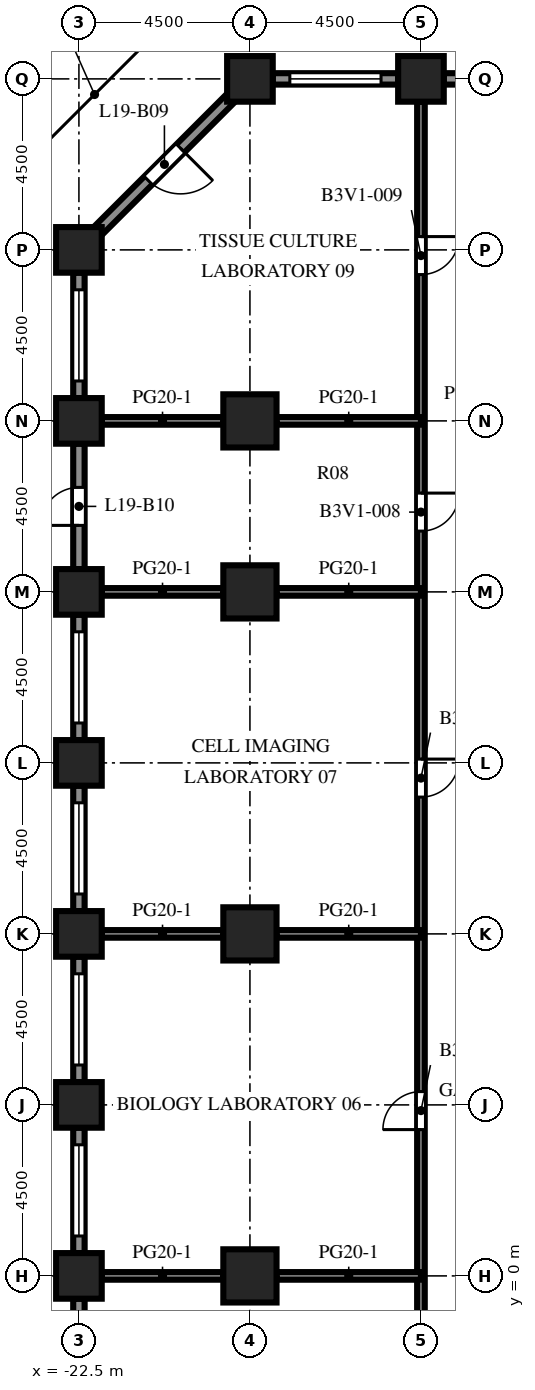
"""IFC4 building model, lengths in metres.
Left out: names, types, materials, properties, quantities, classifications, styles, units other than length and angle.
Written with IfcOpenShell. Run it as: python <this file> out.ifc"""

import sys

from ifc_helpers import new_model, si_unit, direction, frame, frame_2d, origin, origin_2d, place, context, subcontext, project, spatial, rectangle, extrude, element, fill, save


model = new_model("IFC4")
c1 = context("Model", 3, precision=1e-05, world=origin(), true_north=direction((0.0, 1.0)))
c2 = subcontext(c1, "Body", "Model", "MODEL_VIEW")
j1 = project(units=[si_unit("LENGTHUNIT", "METRE"), si_unit("PLANEANGLEUNIT", "RADIAN")], contexts=[c1])
p1 = place(None, origin())
s1 = spatial("IfcSite", under=j1, at=p1, CompositionType="ELEMENT")
p2 = place(p1, origin())
s2 = spatial("IfcBuilding", under=s1, at=p2, CompositionType="ELEMENT")
p3 = place(p2, frame((0.0, 0.0, 86.1)))
s3 = spatial("IfcBuildingStorey", under=s2, at=p3, CompositionType="ELEMENT", Elevation=86.1)
for number, where, z_axis, x_axis in (
    (1, (-22.5, 0.0, 0.0), (0.0, 0.0, 1.0), (1.0, 0.0, 0.0)),
    (2, (-22.5, 4.5, 0.0), (0.0, 0.0, 1.0), (1.0, 0.0, 0.0)),
    (3, (-22.5, 9.0, 0.0), (0.0, 0.0, 1.0), (1.0, 0.0, 0.0)),
    (4, (-22.5, 13.5, 0.0), (0.0, 0.0, 1.0), (1.0, 0.0, 0.0)),
    (5, (-22.5, 18.0, 0.0), (0.0, 0.0, 1.0), (1.0, 0.0, 0.0)),
    (6, (-22.5, 22.5, 0.0), (0.0, 0.0, 1.0), (1.0, 0.0, 0.0)),
    (7, (-22.5, 27.0, 0.0), (0.0, 0.0, 1.0), (1.0, 0.0, 0.0)),
    (8, (-18.0, 31.5, 0.0), (0.0, 0.0, 1.0), (1.0, 0.0, 0.0)),
    (9, (-13.5, 31.5, 0.0), (0.0, 0.0, 1.0), (1.0, 0.0, 0.0)),
):
    element("IfcColumn", number, at=place(p3, frame(where, z_axis=z_axis, x_axis=x_axis)), inside=s3, PredefinedType="COLUMN", context=c2, shape_type="SweptSolid", body=[
        extrude(rectangle(XDim=1.2, YDim=1.2, at=origin_2d()), origin(), (0.0, 0.0, 1.0), 4.1),
    ])
for number, where, z_axis, x_axis in (
    (10, (-18.0, 0.0, 0.0), (0.0, 0.0, 1.0), (1.0, 0.0, 0.0)),
    (11, (-18.0, 9.0, 0.0), (0.0, 0.0, 1.0), (1.0, 0.0, 0.0)),
    (12, (-18.0, 18.0, 0.0), (0.0, 0.0, 1.0), (1.0, 0.0, 0.0)),
    (13, (-18.0, 22.5, 0.0), (0.0, 0.0, 1.0), (1.0, 0.0, 0.0)),
):
    element("IfcColumn", number, at=place(p3, frame(where, z_axis=z_axis, x_axis=x_axis)), inside=s3, PredefinedType="COLUMN", context=c2, shape_type="SweptSolid", body=[
        extrude(rectangle(XDim=1.4, YDim=1.4, at=origin_2d()), origin(), (0.0, 0.0, 1.0), 4.1),
    ])
p4 = place(p3, frame((-12.9, 31.5, 0.0), z_axis=(0.0, 0.0, 1.0), x_axis=(1.0, 0.0, 0.0)))
e14 = element("IfcWall", 14, at=p4, inside=s3, PredefinedType="SOLIDWALL", context=c2, shape_type="SweptSolid", body=[
    extrude(rectangle(XDim=3.3, YDim=0.3, at=frame_2d((1.65, 0.0))), origin(), (0.0, 0.0, 1.0), 2.75),
])
p5 = place(p4, frame((1.15, 0.0, 0.0)))
e15 = element("IfcOpeningElement", 15, at=p5, cuts=e14, PredefinedType="OPENING", context=c2, shape_type="SweptSolid", body=[
    extrude(rectangle(XDim=1.0, YDim=2.2, at=frame_2d((0.5, 1.1))), frame((0.0, 0.16, 0.0), z_axis=(0.0, -1.0, 0.0), x_axis=(1.0, 0.0, 0.0)), (0.0, 0.0, 1.0), 0.32),
])
p6 = place(p3, frame((-17.4, 31.5, 0.0), z_axis=(0.0, 0.0, 1.0), x_axis=(1.0, 0.0, 0.0)))
e16 = element("IfcWall", 16, at=p6, inside=s3, PredefinedType="SOLIDWALL", context=c2, shape_type="SweptSolid", body=[
    extrude(rectangle(XDim=3.3, YDim=0.3, at=frame_2d((1.65, 0.0))), origin(), (0.0, 0.0, 1.0), 2.75),
])
p7 = place(p6, frame((0.45, 0.0, 0.8)))
e17 = element("IfcOpeningElement", 17, at=p7, cuts=e16, PredefinedType="OPENING", context=c2, shape_type="SweptSolid", body=[
    extrude(rectangle(XDim=2.4, YDim=1.7, at=frame_2d((1.2, 0.85))), frame((0.0, 0.16, 0.0), z_axis=(0.0, -1.0, 0.0), x_axis=(1.0, 0.0, 0.0)), (0.0, 0.0, 1.0), 0.32),
])
p8 = place(p3, frame((-22.006, 27.494, 0.0), z_axis=(0.0, 0.0, 1.0), x_axis=(0.707106781187, 0.707106781187, 0.0)))
e18 = element("IfcWall", 18, at=p8, inside=s3, PredefinedType="SOLIDWALL", context=c2, shape_type="SweptSolid", body=[
    extrude(rectangle(XDim=4.967, YDim=0.3, at=frame_2d((2.483, 0.0))), origin(), (0.0, 0.0, 1.0), 2.75),
])
p9 = place(p8, frame((1.884, 0.0, 0.0)))
e19 = element("IfcOpeningElement", 19, at=p9, cuts=e18, PredefinedType="OPENING", context=c2, shape_type="SweptSolid", body=[
    extrude(rectangle(XDim=1.2, YDim=2.2, at=frame_2d((0.6, 1.1))), frame((0.0, 0.16, 0.0), z_axis=(0.0, -1.0, 0.0), x_axis=(1.0, 0.0, 0.0)), (0.0, 0.0, 1.0), 0.32),
])
p10 = place(p3, frame((-22.5, 23.1, 0.0), z_axis=(0.0, 0.0, 1.0), x_axis=(0.0, 1.0, 0.0)))
e20 = element("IfcWall", 20, at=p10, inside=s3, PredefinedType="SOLIDWALL", context=c2, shape_type="SweptSolid", body=[
    extrude(rectangle(XDim=3.3, YDim=0.3, at=frame_2d((1.65, 0.0))), origin(), (0.0, 0.0, 1.0), 2.75),
])
p11 = place(p10, frame((0.45, 0.0, 0.8)))
e21 = element("IfcOpeningElement", 21, at=p11, cuts=e20, PredefinedType="OPENING", context=c2, shape_type="SweptSolid", body=[
    extrude(rectangle(XDim=2.4, YDim=1.7, at=frame_2d((1.2, 0.85))), frame((0.0, 0.16, 0.0), z_axis=(0.0, -1.0, 0.0), x_axis=(1.0, 0.0, 0.0)), (0.0, 0.0, 1.0), 0.32),
])
p12 = place(p3, frame((-22.5, 18.6, 0.0), z_axis=(0.0, 0.0, 1.0), x_axis=(0.0, 1.0, 0.0)))
e22 = element("IfcWall", 22, at=p12, inside=s3, PredefinedType="SOLIDWALL", context=c2, shape_type="SweptSolid", body=[
    extrude(rectangle(XDim=3.3, YDim=0.3, at=frame_2d((1.65, 0.0))), origin(), (0.0, 0.0, 1.0), 2.75),
])
p13 = place(p12, frame((1.15, 0.0, 0.0)))
e23 = element("IfcOpeningElement", 23, at=p13, cuts=e22, PredefinedType="OPENING", context=c2, shape_type="SweptSolid", body=[
    extrude(rectangle(XDim=1.0, YDim=2.2, at=frame_2d((0.5, 1.1))), frame((0.0, 0.16, 0.0), z_axis=(0.0, -1.0, 0.0), x_axis=(1.0, 0.0, 0.0)), (0.0, 0.0, 1.0), 0.32),
])
p14 = place(p3, frame((-22.5, 14.1, 0.0), z_axis=(0.0, 0.0, 1.0), x_axis=(0.0, 1.0, 0.0)))
e24 = element("IfcWall", 24, at=p14, inside=s3, PredefinedType="SOLIDWALL", context=c2, shape_type="SweptSolid", body=[
    extrude(rectangle(XDim=3.3, YDim=0.3, at=frame_2d((1.65, 0.0))), origin(), (0.0, 0.0, 1.0), 2.75),
])
p15 = place(p14, frame((0.45, 0.0, 0.8)))
e25 = element("IfcOpeningElement", 25, at=p15, cuts=e24, PredefinedType="OPENING", context=c2, shape_type="SweptSolid", body=[
    extrude(rectangle(XDim=2.4, YDim=1.7, at=frame_2d((1.2, 0.85))), frame((0.0, 0.16, 0.0), z_axis=(0.0, -1.0, 0.0), x_axis=(1.0, 0.0, 0.0)), (0.0, 0.0, 1.0), 0.32),
])
p16 = place(p3, frame((-22.5, 9.6, 0.0), z_axis=(0.0, 0.0, 1.0), x_axis=(0.0, 1.0, 0.0)))
e26 = element("IfcWall", 26, at=p16, inside=s3, PredefinedType="SOLIDWALL", context=c2, shape_type="SweptSolid", body=[
    extrude(rectangle(XDim=3.3, YDim=0.3, at=frame_2d((1.65, 0.0))), origin(), (0.0, 0.0, 1.0), 2.75),
])
p17 = place(p16, frame((0.45, 0.0, 0.8)))
e27 = element("IfcOpeningElement", 27, at=p17, cuts=e26, PredefinedType="OPENING", context=c2, shape_type="SweptSolid", body=[
    extrude(rectangle(XDim=2.4, YDim=1.7, at=frame_2d((1.2, 0.85))), frame((0.0, 0.16, 0.0), z_axis=(0.0, -1.0, 0.0), x_axis=(1.0, 0.0, 0.0)), (0.0, 0.0, 1.0), 0.32),
])
p18 = place(p3, frame((-22.5, 5.1, 0.0), z_axis=(0.0, 0.0, 1.0), x_axis=(0.0, 1.0, 0.0)))
e28 = element("IfcWall", 28, at=p18, inside=s3, PredefinedType="SOLIDWALL", context=c2, shape_type="SweptSolid", body=[
    extrude(rectangle(XDim=3.3, YDim=0.3, at=frame_2d((1.65, 0.0))), origin(), (0.0, 0.0, 1.0), 2.75),
])
p19 = place(p18, frame((0.45, 0.0, 0.8)))
e29 = element("IfcOpeningElement", 29, at=p19, cuts=e28, PredefinedType="OPENING", context=c2, shape_type="SweptSolid", body=[
    extrude(rectangle(XDim=2.4, YDim=1.7, at=frame_2d((1.2, 0.85))), frame((0.0, 0.16, 0.0), z_axis=(0.0, -1.0, 0.0), x_axis=(1.0, 0.0, 0.0)), (0.0, 0.0, 1.0), 0.32),
])
p20 = place(p3, frame((-22.5, 0.6, 0.0), z_axis=(0.0, 0.0, 1.0), x_axis=(0.0, 1.0, 0.0)))
e30 = element("IfcWall", 30, at=p20, inside=s3, PredefinedType="SOLIDWALL", context=c2, shape_type="SweptSolid", body=[
    extrude(rectangle(XDim=3.3, YDim=0.3, at=frame_2d((1.65, 0.0))), origin(), (0.0, 0.0, 1.0), 2.75),
])
p21 = place(p20, frame((0.45, 0.0, 0.8)))
e31 = element("IfcOpeningElement", 31, at=p21, cuts=e30, PredefinedType="OPENING", context=c2, shape_type="SweptSolid", body=[
    extrude(rectangle(XDim=2.4, YDim=1.7, at=frame_2d((1.2, 0.85))), frame((0.0, 0.16, 0.0), z_axis=(0.0, -1.0, 0.0), x_axis=(1.0, 0.0, 0.0)), (0.0, 0.0, 1.0), 0.32),
])
p22 = place(p3, frame((-22.5, -3.9, 0.0), z_axis=(0.0, 0.0, 1.0), x_axis=(0.0, 1.0, 0.0)))
e32 = element("IfcWall", 32, at=p22, inside=s3, PredefinedType="SOLIDWALL", context=c2, shape_type="SweptSolid", body=[
    extrude(rectangle(XDim=3.3, YDim=0.3, at=frame_2d((1.65, 0.0))), origin(), (0.0, 0.0, 1.0), 2.75),
])
p23 = place(p22, frame((0.45, 0.0, 0.8)))
e33 = element("IfcOpeningElement", 33, at=p23, cuts=e32, PredefinedType="OPENING", context=c2, shape_type="SweptSolid", body=[
    extrude(rectangle(XDim=2.4, YDim=1.7, at=frame_2d((1.2, 0.85))), frame((0.0, 0.16, 0.0), z_axis=(0.0, -1.0, 0.0), x_axis=(1.0, 0.0, 0.0)), (0.0, 0.0, 1.0), 0.32),
])
p24 = place(p3, frame((-13.5, -21.9, 0.0), z_axis=(0.0, 0.0, 1.0), x_axis=(0.0, 1.0, 0.0)))
e34 = element("IfcWall", 34, at=p24, inside=s3, PredefinedType="PARTITIONING", context=c2, shape_type="SweptSolid", body=[
    extrude(rectangle(XDim=52.8, YDim=0.2, at=frame_2d((26.4, 0.0))), origin(), (0.0, 0.0, 1.0), 3.65),
])
p25 = place(p24, frame((3.0, 0.0, 0.0)))
e35 = element("IfcOpeningElement", 35, at=p25, cuts=e34, PredefinedType="OPENING", context=c2, shape_type="SweptSolid", body=[
    extrude(rectangle(XDim=1.0, YDim=2.1, at=frame_2d((0.5, 1.05))), frame((0.0, 0.11, 0.0), z_axis=(0.0, -1.0, 0.0), x_axis=(1.0, 0.0, 0.0)), (0.0, 0.0, 1.0), 0.22),
])
p26 = place(p24, frame((15.0, 0.0, 0.0)))
e36 = element("IfcOpeningElement", 36, at=p26, cuts=e34, PredefinedType="OPENING", context=c2, shape_type="SweptSolid", body=[
    extrude(rectangle(XDim=1.0, YDim=2.1, at=frame_2d((0.5, 1.05))), frame((0.0, 0.11, 0.0), z_axis=(0.0, -1.0, 0.0), x_axis=(1.0, 0.0, 0.0)), (0.0, 0.0, 1.0), 0.22),
])
p27 = place(p24, frame((25.75, 0.0, 0.0)))
e37 = element("IfcOpeningElement", 37, at=p27, cuts=e34, PredefinedType="OPENING", context=c2, shape_type="SweptSolid", body=[
    extrude(rectangle(XDim=1.0, YDim=2.1, at=frame_2d((0.5, 1.05))), frame((0.0, 0.11, 0.0), z_axis=(0.0, -1.0, 0.0), x_axis=(1.0, 0.0, 0.0)), (0.0, 0.0, 1.0), 0.22),
])
p28 = place(p24, frame((34.5, 0.0, 0.0)))
e38 = element("IfcOpeningElement", 38, at=p28, cuts=e34, PredefinedType="OPENING", context=c2, shape_type="SweptSolid", body=[
    extrude(rectangle(XDim=1.0, YDim=2.1, at=frame_2d((0.5, 1.05))), frame((0.0, 0.11, 0.0), z_axis=(0.0, -1.0, 0.0), x_axis=(1.0, 0.0, 0.0)), (0.0, 0.0, 1.0), 0.22),
])
p29 = place(p24, frame((41.5, 0.0, 0.0)))
e39 = element("IfcOpeningElement", 39, at=p29, cuts=e34, PredefinedType="OPENING", context=c2, shape_type="SweptSolid", body=[
    extrude(rectangle(XDim=1.0, YDim=2.1, at=frame_2d((0.5, 1.05))), frame((0.0, 0.11, 0.0), z_axis=(0.0, -1.0, 0.0), x_axis=(1.0, 0.0, 0.0)), (0.0, 0.0, 1.0), 0.22),
])
p30 = place(p24, frame((48.25, 0.0, 0.0)))
e40 = element("IfcOpeningElement", 40, at=p30, cuts=e34, PredefinedType="OPENING", context=c2, shape_type="SweptSolid", body=[
    extrude(rectangle(XDim=1.0, YDim=2.1, at=frame_2d((0.5, 1.05))), frame((0.0, 0.11, 0.0), z_axis=(0.0, -1.0, 0.0), x_axis=(1.0, 0.0, 0.0)), (0.0, 0.0, 1.0), 0.22),
])
p31 = place(p3, frame((-21.9, 0.0, 0.0), z_axis=(0.0, 0.0, 1.0), x_axis=(1.0, 0.0, 0.0)))
e41 = element("IfcWall", 41, at=p31, inside=s3, PredefinedType="PARTITIONING", context=c2, shape_type="SweptSolid", body=[
    extrude(rectangle(XDim=3.2, YDim=0.2, at=frame_2d((1.6, 0.0))), origin(), (0.0, 0.0, 1.0), 3.65),
])
p32 = place(p3, frame((-17.3, 0.0, 0.0), z_axis=(0.0, 0.0, 1.0), x_axis=(1.0, 0.0, 0.0)))
e42 = element("IfcWall", 42, at=p32, inside=s3, PredefinedType="PARTITIONING", context=c2, shape_type="SweptSolid", body=[
    extrude(rectangle(XDim=3.8, YDim=0.2, at=frame_2d((1.9, 0.0))), origin(), (0.0, 0.0, 1.0), 3.65),
])
p33 = place(p3, frame((-21.9, 9.0, 0.0), z_axis=(0.0, 0.0, 1.0), x_axis=(1.0, 0.0, 0.0)))
e43 = element("IfcWall", 43, at=p33, inside=s3, PredefinedType="PARTITIONING", context=c2, shape_type="SweptSolid", body=[
    extrude(rectangle(XDim=3.2, YDim=0.2, at=frame_2d((1.6, 0.0))), origin(), (0.0, 0.0, 1.0), 3.65),
])
p34 = place(p3, frame((-17.3, 9.0, 0.0), z_axis=(0.0, 0.0, 1.0), x_axis=(1.0, 0.0, 0.0)))
e44 = element("IfcWall", 44, at=p34, inside=s3, PredefinedType="PARTITIONING", context=c2, shape_type="SweptSolid", body=[
    extrude(rectangle(XDim=3.8, YDim=0.2, at=frame_2d((1.9, 0.0))), origin(), (0.0, 0.0, 1.0), 3.65),
])
p35 = place(p3, frame((-21.9, 18.0, 0.0), z_axis=(0.0, 0.0, 1.0), x_axis=(1.0, 0.0, 0.0)))
e45 = element("IfcWall", 45, at=p35, inside=s3, PredefinedType="PARTITIONING", context=c2, shape_type="SweptSolid", body=[
    extrude(rectangle(XDim=3.2, YDim=0.2, at=frame_2d((1.6, 0.0))), origin(), (0.0, 0.0, 1.0), 3.65),
])
p36 = place(p3, frame((-17.3, 18.0, 0.0), z_axis=(0.0, 0.0, 1.0), x_axis=(1.0, 0.0, 0.0)))
e46 = element("IfcWall", 46, at=p36, inside=s3, PredefinedType="PARTITIONING", context=c2, shape_type="SweptSolid", body=[
    extrude(rectangle(XDim=3.8, YDim=0.2, at=frame_2d((1.9, 0.0))), origin(), (0.0, 0.0, 1.0), 3.65),
])
p37 = place(p3, frame((-21.9, 22.5, 0.0), z_axis=(0.0, 0.0, 1.0), x_axis=(1.0, 0.0, 0.0)))
e47 = element("IfcWall", 47, at=p37, inside=s3, PredefinedType="PARTITIONING", context=c2, shape_type="SweptSolid", body=[
    extrude(rectangle(XDim=3.2, YDim=0.2, at=frame_2d((1.6, 0.0))), origin(), (0.0, 0.0, 1.0), 3.65),
])
p38 = place(p3, frame((-17.3, 22.5, 0.0), z_axis=(0.0, 0.0, 1.0), x_axis=(1.0, 0.0, 0.0)))
e48 = element("IfcWall", 48, at=p38, inside=s3, PredefinedType="PARTITIONING", context=c2, shape_type="SweptSolid", body=[
    extrude(rectangle(XDim=3.8, YDim=0.2, at=frame_2d((1.9, 0.0))), origin(), (0.0, 0.0, 1.0), 3.65),
])
p39 = place(p7, origin())
e49 = element("IfcWindow", 49, at=p39, inside=s3, PartitioningType="SINGLE_PANEL", PredefinedType="WINDOW", context=c2, shape_type="SweptSolid", body=[
    extrude(rectangle(XDim=2.4, YDim=1.7, at=frame_2d((1.2, 0.85))), frame((0.0, 0.03, 0.0), z_axis=(0.0, -1.0, 0.0), x_axis=(1.0, 0.0, 0.0)), (0.0, 0.0, 1.0), 0.06),
])
fill(e17, e49)
p40 = place(p9, origin())
e50 = element("IfcDoor", 50, at=p40, inside=s3, OperationType="SINGLE_SWING_RIGHT", PredefinedType="DOOR", context=c2, shape_type="SweptSolid", body=[
    extrude(rectangle(XDim=1.2, YDim=2.2, at=frame_2d((0.6, 1.1))), frame((0.0, 0.025, 0.0), z_axis=(0.0, -1.0, 0.0), x_axis=(1.0, 0.0, 0.0)), (0.0, 0.0, 1.0), 0.05),
])
fill(e19, e50)
p41 = place(p11, origin())
e51 = element("IfcWindow", 51, at=p41, inside=s3, PartitioningType="SINGLE_PANEL", PredefinedType="WINDOW", context=c2, shape_type="SweptSolid", body=[
    extrude(rectangle(XDim=2.4, YDim=1.7, at=frame_2d((1.2, 0.85))), frame((0.0, 0.03, 0.0), z_axis=(0.0, -1.0, 0.0), x_axis=(1.0, 0.0, 0.0)), (0.0, 0.0, 1.0), 0.06),
])
fill(e21, e51)
p42 = place(p13, origin())
e52 = element("IfcDoor", 52, at=p42, inside=s3, OperationType="SINGLE_SWING_LEFT", PredefinedType="DOOR", context=c2, shape_type="SweptSolid", body=[
    extrude(rectangle(XDim=1.0, YDim=2.2, at=frame_2d((0.5, 1.1))), frame((0.0, 0.025, 0.0), z_axis=(0.0, -1.0, 0.0), x_axis=(1.0, 0.0, 0.0)), (0.0, 0.0, 1.0), 0.05),
])
fill(e23, e52)
p43 = place(p15, origin())
e53 = element("IfcWindow", 53, at=p43, inside=s3, PartitioningType="SINGLE_PANEL", PredefinedType="WINDOW", context=c2, shape_type="SweptSolid", body=[
    extrude(rectangle(XDim=2.4, YDim=1.7, at=frame_2d((1.2, 0.85))), frame((0.0, 0.03, 0.0), z_axis=(0.0, -1.0, 0.0), x_axis=(1.0, 0.0, 0.0)), (0.0, 0.0, 1.0), 0.06),
])
fill(e25, e53)
p44 = place(p17, origin())
e54 = element("IfcWindow", 54, at=p44, inside=s3, PartitioningType="SINGLE_PANEL", PredefinedType="WINDOW", context=c2, shape_type="SweptSolid", body=[
    extrude(rectangle(XDim=2.4, YDim=1.7, at=frame_2d((1.2, 0.85))), frame((0.0, 0.03, 0.0), z_axis=(0.0, -1.0, 0.0), x_axis=(1.0, 0.0, 0.0)), (0.0, 0.0, 1.0), 0.06),
])
fill(e27, e54)
p45 = place(p19, origin())
e55 = element("IfcWindow", 55, at=p45, inside=s3, PartitioningType="SINGLE_PANEL", PredefinedType="WINDOW", context=c2, shape_type="SweptSolid", body=[
    extrude(rectangle(XDim=2.4, YDim=1.7, at=frame_2d((1.2, 0.85))), frame((0.0, 0.03, 0.0), z_axis=(0.0, -1.0, 0.0), x_axis=(1.0, 0.0, 0.0)), (0.0, 0.0, 1.0), 0.06),
])
fill(e29, e55)
p46 = place(p21, origin())
e56 = element("IfcWindow", 56, at=p46, inside=s3, PartitioningType="SINGLE_PANEL", PredefinedType="WINDOW", context=c2, shape_type="SweptSolid", body=[
    extrude(rectangle(XDim=2.4, YDim=1.7, at=frame_2d((1.2, 0.85))), frame((0.0, 0.03, 0.0), z_axis=(0.0, -1.0, 0.0), x_axis=(1.0, 0.0, 0.0)), (0.0, 0.0, 1.0), 0.06),
])
fill(e31, e56)
p47 = place(p27, origin())
e57 = element("IfcDoor", 57, at=p47, inside=s3, OperationType="SINGLE_SWING_LEFT", PredefinedType="DOOR", context=c2, shape_type="SweptSolid", body=[
    extrude(rectangle(XDim=1.0, YDim=2.1, at=frame_2d((0.5, 1.05))), frame((0.0, 0.025, 0.0), z_axis=(0.0, -1.0, 0.0), x_axis=(1.0, 0.0, 0.0)), (0.0, 0.0, 1.0), 0.05),
])
fill(e37, e57)
p48 = place(p28, origin())
e58 = element("IfcDoor", 58, at=p48, inside=s3, OperationType="SINGLE_SWING_RIGHT", PredefinedType="DOOR", context=c2, shape_type="SweptSolid", body=[
    extrude(rectangle(XDim=1.0, YDim=2.1, at=frame_2d((0.5, 1.05))), frame((0.0, 0.025, 0.0), z_axis=(0.0, -1.0, 0.0), x_axis=(1.0, 0.0, 0.0)), (0.0, 0.0, 1.0), 0.05),
])
fill(e38, e58)
p49 = place(p29, origin())
e59 = element("IfcDoor", 59, at=p49, inside=s3, OperationType="SINGLE_SWING_RIGHT", PredefinedType="DOOR", context=c2, shape_type="SweptSolid", body=[
    extrude(rectangle(XDim=1.0, YDim=2.1, at=frame_2d((0.5, 1.05))), frame((0.0, 0.025, 0.0), z_axis=(0.0, -1.0, 0.0), x_axis=(1.0, 0.0, 0.0)), (0.0, 0.0, 1.0), 0.05),
])
fill(e39, e59)
p50 = place(p30, origin())
e60 = element("IfcDoor", 60, at=p50, inside=s3, OperationType="SINGLE_SWING_RIGHT", PredefinedType="DOOR", context=c2, shape_type="SweptSolid", body=[
    extrude(rectangle(XDim=1.0, YDim=2.1, at=frame_2d((0.5, 1.05))), frame((0.0, 0.025, 0.0), z_axis=(0.0, -1.0, 0.0), x_axis=(1.0, 0.0, 0.0)), (0.0, 0.0, 1.0), 0.05),
])
fill(e40, e60)
save(model, sys.argv[1])
